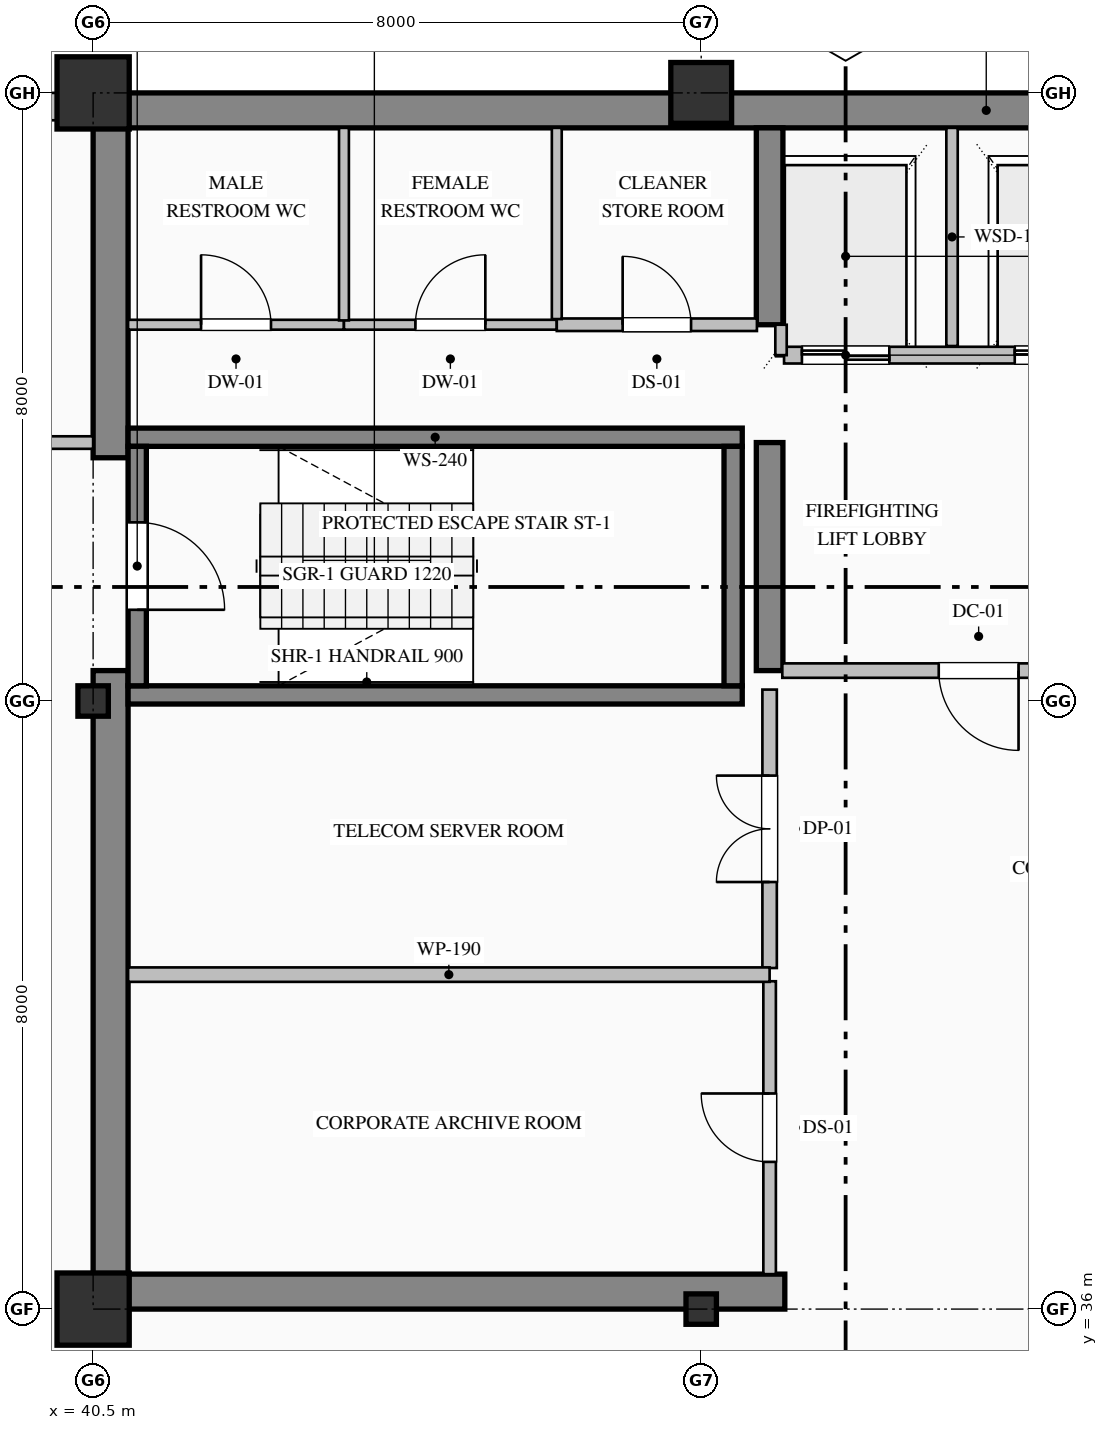
"""IFC4 building model, lengths in metres.
Left out: names, types, materials, properties, quantities, classifications, styles, units other than length and angle.
Written with IfcOpenShell. Run it as: python <this file> out.ifc"""

import sys

from ifc_helpers import new_model, si_unit, direction, frame, frame_2d, origin, origin_2d, place, context, subcontext, project, spatial, rectangle, hollow_rectangle, i_section, extrude, element, fill, save


model = new_model("IFC4")
c1 = context("Model", 3, precision=1e-05, world=origin(), true_north=direction((0.0, 1.0)))
c2 = subcontext(c1, "Body", "Model", "MODEL_VIEW")
j1 = project(units=[si_unit("LENGTHUNIT", "METRE"), si_unit("PLANEANGLEUNIT", "RADIAN")], contexts=[c1])
p1 = place(None, origin())
s1 = spatial("IfcSite", under=j1, at=p1, CompositionType="ELEMENT")
p2 = place(p1, origin())
s2 = spatial("IfcBuilding", under=s1, at=p2, CompositionType="ELEMENT")
p3 = place(p2, frame((0.0, 0.0, 237.8)))
s3 = spatial("IfcBuildingStorey", under=s2, at=p3, CompositionType="ELEMENT", Elevation=237.8)
p4 = place(p3, frame((40.5, 51.77, 0.0), z_axis=(0.0, 0.0, 1.0), x_axis=(1.0, 0.0, 0.0)))
e1 = element("IfcWall", 1, at=p4, inside=s3, PredefinedType="SHEAR", context=c2, shape_type="SweptSolid", body=[
    extrude(rectangle(XDim=23.5, YDim=0.46, at=frame_2d((11.75, 0.0))), origin(), (0.0, 0.0, 1.0), 3.775),
])
p5 = place(p3, frame((40.73, 36.46, 0.0), z_axis=(0.0, 0.0, 1.0), x_axis=(0.0, 1.0, 0.0)))
e2 = element("IfcWall", 2, at=p5, inside=s3, PredefinedType="SHEAR", context=c2, shape_type="SweptSolid", body=[
    extrude(rectangle(XDim=7.94, YDim=0.46, at=frame_2d((3.97, 0.0))), origin(), (0.0, 0.0, 1.0), 3.775),
])
p6 = place(p3, frame((40.73, 47.2, 0.0), z_axis=(0.0, 0.0, 1.0), x_axis=(0.0, 1.0, 0.0)))
e3 = element("IfcWall", 3, at=p6, inside=s3, PredefinedType="SHEAR", context=c2, shape_type="SweptSolid", body=[
    extrude(rectangle(XDim=4.34, YDim=0.46, at=frame_2d((2.17, 0.0))), origin(), (0.0, 0.0, 1.0), 3.775),
])
p7 = place(p3, frame((40.5, 36.23, 0.0), z_axis=(0.0, 0.0, 1.0), x_axis=(1.0, 0.0, 0.0)))
e4 = element("IfcWall", 4, at=p7, inside=s3, PredefinedType="SHEAR", context=c2, shape_type="SweptSolid", body=[
    extrude(rectangle(XDim=9.1, YDim=0.46, at=frame_2d((4.55, 0.0))), origin(), (0.0, 0.0, 1.0), 3.775),
])
p8 = place(p3, frame((49.4, 44.4, 0.0), z_axis=(0.0, 0.0, 1.0), x_axis=(0.0, 1.0, 0.0)))
e5 = element("IfcWall", 5, at=p8, inside=s3, PredefinedType="SHEAR", context=c2, shape_type="SweptSolid", body=[
    extrude(rectangle(XDim=3.0, YDim=0.35, at=frame_2d((1.5, 0.0))), origin(), (0.0, 0.0, 1.0), 3.775),
])
p9 = place(p3, frame((49.4, 48.95, 0.0), z_axis=(0.0, 0.0, 1.0), x_axis=(0.0, 1.0, 0.0)))
e6 = element("IfcWall", 6, at=p9, inside=s3, PredefinedType="SHEAR", context=c2, shape_type="SweptSolid", body=[
    extrude(rectangle(XDim=2.59, YDim=0.35, at=frame_2d((1.295, 0.0))), origin(), (0.0, 0.0, 1.0), 3.775),
])
p10 = place(p3, frame((40.5, 36.0, 0.0), z_axis=(0.0, 0.0, 1.0), x_axis=(1.0, 0.0, 0.0)))
e7 = element("IfcColumn", 7, at=p10, inside=s3, PredefinedType="COLUMN", context=c2, shape_type="SweptSolid", body=[
    extrude(hollow_rectangle(XDim=0.95, YDim=0.95, WallThickness=0.036, at=origin_2d()), origin(), (0.0, 0.0, 1.0), 4.0),
])
p11 = place(p3, frame((40.5, 44.0, 0.0), z_axis=(0.0, 0.0, 1.0), x_axis=(1.0, 0.0, 0.0)))
e8 = element("IfcColumn", 8, at=p11, inside=s3, PredefinedType="COLUMN", context=c2, shape_type="SweptSolid", body=[
    extrude(i_section(OverallWidth=0.4, OverallDepth=0.4, WebThickness=0.013, FlangeThickness=0.021, FilletRadius=0.022, at=origin_2d()), origin(), (0.0, 0.0, 1.0), 4.0),
])
p12 = place(p3, frame((40.5, 52.0, 0.0), z_axis=(0.0, 0.0, 1.0), x_axis=(1.0, 0.0, 0.0)))
e9 = element("IfcColumn", 9, at=p12, inside=s3, PredefinedType="COLUMN", context=c2, shape_type="SweptSolid", body=[
    extrude(hollow_rectangle(XDim=0.95, YDim=0.95, WallThickness=0.036, at=origin_2d()), origin(), (0.0, 0.0, 1.0), 4.0),
])
p13 = place(p3, frame((48.5, 36.0, 0.0), z_axis=(0.0, 0.0, 1.0), x_axis=(1.0, 0.0, 0.0)))
e10 = element("IfcColumn", 10, at=p13, inside=s3, PredefinedType="COLUMN", context=c2, shape_type="SweptSolid", body=[
    extrude(i_section(OverallWidth=0.4, OverallDepth=0.4, WebThickness=0.013, FlangeThickness=0.021, FilletRadius=0.022, at=origin_2d()), origin(), (0.0, 0.0, 1.0), 4.0),
])
p14 = place(p3, frame((48.5, 52.0, 0.0), z_axis=(0.0, 0.0, 1.0), x_axis=(1.0, 0.0, 0.0)))
e11 = element("IfcColumn", 11, at=p14, inside=s3, PredefinedType="COLUMN", context=c2, shape_type="SweptSolid", body=[
    extrude(hollow_rectangle(XDim=0.8, YDim=0.8, WallThickness=0.032, at=origin_2d()), origin(), (0.0, 0.0, 1.0), 4.0),
])
p15 = place(p3, frame((13.0, 51.82, 0.0), z_axis=(0.0, 0.0, 1.0), x_axis=(1.0, 0.0, 0.0)))
e12 = element("IfcWall", 12, at=p15, inside=s3, PredefinedType="SOLIDWALL", context=c2, shape_type="SweptSolid", body=[
    extrude(rectangle(XDim=27.52, YDim=0.36, at=frame_2d((13.76, 0.0))), origin(), (0.0, 0.0, 1.0), 3.325),
])
p16 = place(p15, frame((6.6, 0.0, 0.9)))
e13 = element("IfcOpeningElement", 13, at=p16, cuts=e12, PredefinedType="OPENING", context=c2, shape_type="SweptSolid", body=[
    extrude(rectangle(XDim=1.2, YDim=1.85, at=frame_2d((0.6, 0.925))), frame((0.0, 0.19, 0.0), z_axis=(0.0, -1.0, 0.0), x_axis=(1.0, 0.0, 0.0)), (0.0, 0.0, 1.0), 0.38),
])
p17 = place(p15, frame((17.4, 0.0, 0.9)))
e14 = element("IfcOpeningElement", 14, at=p17, cuts=e12, PredefinedType="OPENING", context=c2, shape_type="SweptSolid", body=[
    extrude(rectangle(XDim=1.2, YDim=1.85, at=frame_2d((0.6, 0.925))), frame((0.0, 0.19, 0.0), z_axis=(0.0, -1.0, 0.0), x_axis=(1.0, 0.0, 0.0)), (0.0, 0.0, 1.0), 0.38),
])
for number, where, z_axis, x_axis in (
    (15, (40.96, 47.47, 0.0), (0.0, 0.0, 1.0), (1.0, 0.0, 0.0)),
    (16, (49.04, 44.08, 0.0), (0.0, 0.0, 1.0), (-1.0, 0.0, 0.0)),
):
    element("IfcWall", number, at=place(p3, frame(where, z_axis=z_axis, x_axis=x_axis)), inside=s3, PredefinedType="SOLIDWALL", context=c2, shape_type="SweptSolid", body=[
        extrude(rectangle(XDim=8.08, YDim=0.24, at=frame_2d((4.04, 0.0))), origin(), (0.0, 0.0, 1.0), 4.0),
    ])
p18 = place(p3, frame((41.08, 47.35, 0.0), z_axis=(0.0, 0.0, 1.0), x_axis=(0.0, -1.0, 0.0)))
e17 = element("IfcWall", 17, at=p18, inside=s3, PredefinedType="SOLIDWALL", context=c2, shape_type="SweptSolid", body=[
    extrude(rectangle(XDim=3.15, YDim=0.24, at=frame_2d((1.575, 0.0))), origin(), (0.0, 0.0, 1.0), 4.0),
])
p19 = place(p18, frame((1.0, 0.0, 0.0)))
e18 = element("IfcOpeningElement", 18, at=p19, cuts=e17, PredefinedType="OPENING", context=c2, shape_type="SweptSolid", body=[
    extrude(rectangle(XDim=1.15, YDim=2.2, at=frame_2d((0.575, 1.1))), frame((0.0, 0.13, 0.0), z_axis=(0.0, -1.0, 0.0), x_axis=(1.0, 0.0, 0.0)), (0.0, 0.0, 1.0), 0.26),
])
p20 = place(p3, frame((48.92, 44.2, 0.0), z_axis=(0.0, 0.0, 1.0), x_axis=(0.0, 1.0, 0.0)))
e19 = element("IfcWall", 19, at=p20, inside=s3, PredefinedType="SOLIDWALL", context=c2, shape_type="SweptSolid", body=[
    extrude(rectangle(XDim=3.15, YDim=0.24, at=frame_2d((1.575, 0.0))), origin(), (0.0, 0.0, 1.0), 4.0),
])
p21 = place(p3, frame((54.71, 48.55, 0.0), z_axis=(0.0, 0.0, 1.0), x_axis=(-1.0, 0.0, 0.0)))
e20 = element("IfcWall", 20, at=p21, inside=s3, PredefinedType="PARTITIONING", context=c2, shape_type="SweptSolid", body=[
    extrude(rectangle(XDim=5.12, YDim=0.22, at=frame_2d((2.56, 0.0))), origin(), (0.0, 0.0, 1.0), 3.775),
])
p22 = place(p21, frame((3.735, 0.0, 0.0)))
e21 = element("IfcOpeningElement", 21, at=p22, cuts=e20, PredefinedType="OPENING", context=c2, shape_type="SweptSolid", body=[
    extrude(rectangle(XDim=1.15, YDim=2.2, at=frame_2d((0.575, 1.1))), frame((0.0, 0.12, 0.0), z_axis=(0.0, -1.0, 0.0), x_axis=(1.0, 0.0, 0.0)), (0.0, 0.0, 1.0), 0.24),
])
p23 = place(p21, frame((0.935, 0.0, 0.0)))
e22 = element("IfcOpeningElement", 22, at=p23, cuts=e20, PredefinedType="OPENING", context=c2, shape_type="SweptSolid", body=[
    extrude(rectangle(XDim=1.15, YDim=2.2, at=frame_2d((0.575, 1.1))), frame((0.0, 0.12, 0.0), z_axis=(0.0, -1.0, 0.0), x_axis=(1.0, 0.0, 0.0)), (0.0, 0.0, 1.0), 0.24),
])
p24 = place(p3, frame((51.8, 48.67, 0.0), z_axis=(0.0, 0.0, 1.0), x_axis=(0.0, 1.0, 0.0)))
e23 = element("IfcWall", 23, at=p24, inside=s3, PredefinedType="PARTITIONING", context=c2, shape_type="SweptSolid", body=[
    extrude(rectangle(XDim=2.87, YDim=0.15, at=frame_2d((1.435, 0.0))), origin(), (0.0, 0.0, 1.0), 3.775),
])
p25 = place(p3, frame((49.55, 48.55, 0.0), z_axis=(0.0, 0.0, 1.0), x_axis=(0.0, 1.0, 0.0)))
e24 = element("IfcWall", 24, at=p25, inside=s3, PredefinedType="PARTITIONING", context=c2, shape_type="SweptSolid", body=[
    extrude(rectangle(XDim=0.4, YDim=0.15, at=frame_2d((0.2, 0.0))), origin(), (0.0, 0.0, 1.0), 3.775),
])
p26 = place(p3, frame((37.8, 47.4, 0.0), z_axis=(0.0, 0.0, 1.0), x_axis=(1.0, 0.0, 0.0)))
e25 = element("IfcWall", 25, at=p26, inside=s3, PredefinedType="PARTITIONING", context=c2, shape_type="SweptSolid", body=[
    extrude(rectangle(XDim=2.7, YDim=0.165, at=frame_2d((1.35, 0.0))), origin(), (0.0, 0.0, 1.0), 3.775),
])
p27 = place(p26, frame((0.825, 0.0, 0.0)))
e26 = element("IfcOpeningElement", 26, at=p27, cuts=e25, PredefinedType="OPENING", context=c2, shape_type="SweptSolid", body=[
    extrude(rectangle(XDim=1.05, YDim=2.15, at=frame_2d((0.525, 1.075))), frame((0.0, 0.093, 0.0), z_axis=(0.0, -1.0, 0.0), x_axis=(1.0, 0.0, 0.0)), (0.0, 0.0, 1.0), 0.185),
])
p28 = place(p3, frame((40.96, 48.95, 0.0), z_axis=(0.0, 0.0, 1.0), x_axis=(1.0, 0.0, 0.0)))
e27 = element("IfcWall", 27, at=p28, inside=s3, PredefinedType="PARTITIONING", context=c2, shape_type="SweptSolid", body=[
    extrude(rectangle(XDim=2.84, YDim=0.13, at=frame_2d((1.42, 0.0))), origin(), (0.0, 0.0, 1.0), 3.775),
])
p29 = place(p28, frame((0.96, 0.0, 0.0)))
e28 = element("IfcOpeningElement", 28, at=p29, cuts=e27, PredefinedType="OPENING", context=c2, shape_type="SweptSolid", body=[
    extrude(rectangle(XDim=0.92, YDim=2.15, at=frame_2d((0.46, 1.075))), frame((0.0, 0.075, 0.0), z_axis=(0.0, -1.0, 0.0), x_axis=(1.0, 0.0, 0.0)), (0.0, 0.0, 1.0), 0.15),
])
p30 = place(p3, frame((43.8, 48.95, 0.0), z_axis=(0.0, 0.0, 1.0), x_axis=(1.0, 0.0, 0.0)))
e29 = element("IfcWall", 29, at=p30, inside=s3, PredefinedType="PARTITIONING", context=c2, shape_type="SweptSolid", body=[
    extrude(rectangle(XDim=2.8, YDim=0.13, at=frame_2d((1.4, 0.0))), origin(), (0.0, 0.0, 1.0), 3.775),
])
p31 = place(p30, frame((0.94, 0.0, 0.0)))
e30 = element("IfcOpeningElement", 30, at=p31, cuts=e29, PredefinedType="OPENING", context=c2, shape_type="SweptSolid", body=[
    extrude(rectangle(XDim=0.92, YDim=2.15, at=frame_2d((0.46, 1.075))), frame((0.0, 0.075, 0.0), z_axis=(0.0, -1.0, 0.0), x_axis=(1.0, 0.0, 0.0)), (0.0, 0.0, 1.0), 0.15),
])
p32 = place(p3, frame((46.6, 48.95, 0.0), z_axis=(0.0, 0.0, 1.0), x_axis=(1.0, 0.0, 0.0)))
e31 = element("IfcWall", 31, at=p32, inside=s3, PredefinedType="PARTITIONING", context=c2, shape_type="SweptSolid", body=[
    extrude(rectangle(XDim=2.633, YDim=0.165, at=frame_2d((1.316, 0.0))), origin(), (0.0, 0.0, 1.0), 3.775),
])
p33 = place(p32, frame((0.866, 0.0, 0.0)))
e32 = element("IfcOpeningElement", 32, at=p33, cuts=e31, PredefinedType="OPENING", context=c2, shape_type="SweptSolid", body=[
    extrude(rectangle(XDim=0.9, YDim=2.15, at=frame_2d((0.45, 1.075))), frame((0.0, 0.093, 0.0), z_axis=(0.0, -1.0, 0.0), x_axis=(1.0, 0.0, 0.0)), (0.0, 0.0, 1.0), 0.185),
])
p34 = place(p3, frame((54.733, 44.4, 0.0), z_axis=(0.0, 0.0, 1.0), x_axis=(-1.0, 0.0, 0.0)))
e33 = element("IfcWall", 33, at=p34, inside=s3, PredefinedType="PARTITIONING", context=c2, shape_type="SweptSolid", body=[
    extrude(rectangle(XDim=5.166, YDim=0.19, at=frame_2d((2.583, 0.0))), origin(), (0.0, 0.0, 1.0), 3.775),
])
p35 = place(p34, frame((2.058, 0.0, 0.0)))
e34 = element("IfcOpeningElement", 34, at=p35, cuts=e33, PredefinedType="OPENING", context=c2, shape_type="SweptSolid", body=[
    extrude(rectangle(XDim=1.05, YDim=2.15, at=frame_2d((0.525, 1.075))), frame((0.0, 0.105, 0.0), z_axis=(0.0, -1.0, 0.0), x_axis=(1.0, 0.0, 0.0)), (0.0, 0.0, 1.0), 0.21),
])
p36 = place(p3, frame((49.4, 36.46, 0.0), z_axis=(0.0, 0.0, 1.0), x_axis=(0.0, 1.0, 0.0)))
e35 = element("IfcWall", 35, at=p36, inside=s3, PredefinedType="PARTITIONING", context=c2, shape_type="SweptSolid", body=[
    extrude(rectangle(XDim=3.853, YDim=0.165, at=frame_2d((1.927, 0.0))), origin(), (0.0, 0.0, 1.0), 3.017),
])
p37 = place(p36, frame((1.477, 0.0, 0.0)))
e36 = element("IfcOpeningElement", 36, at=p37, cuts=e35, PredefinedType="OPENING", context=c2, shape_type="SweptSolid", body=[
    extrude(rectangle(XDim=0.9, YDim=2.15, at=frame_2d((0.45, 1.075))), frame((0.0, 0.093, 0.0), z_axis=(0.0, -1.0, 0.0), x_axis=(1.0, 0.0, 0.0)), (0.0, 0.0, 1.0), 0.185),
])
p38 = place(p3, frame((49.4, 40.487, 0.0), z_axis=(0.0, 0.0, 1.0), x_axis=(0.0, 1.0, 0.0)))
e37 = element("IfcWall", 37, at=p38, inside=s3, PredefinedType="PARTITIONING", context=c2, shape_type="SweptSolid", body=[
    extrude(rectangle(XDim=3.663, YDim=0.19, at=frame_2d((1.832, 0.0))), origin(), (0.0, 0.0, 1.0), 3.017),
])
p39 = place(p38, frame((1.132, 0.0, 0.0)))
e38 = element("IfcOpeningElement", 38, at=p39, cuts=e37, PredefinedType="OPENING", context=c2, shape_type="SweptSolid", body=[
    extrude(rectangle(XDim=1.4, YDim=2.25, at=frame_2d((0.7, 1.125))), frame((0.0, 0.105, 0.0), z_axis=(0.0, -1.0, 0.0), x_axis=(1.0, 0.0, 0.0)), (0.0, 0.0, 1.0), 0.21),
])
p40 = place(p3, frame((40.96, 40.4, 0.0), z_axis=(0.0, 0.0, 1.0), x_axis=(1.0, 0.0, 0.0)))
e39 = element("IfcWall", 39, at=p40, inside=s3, PredefinedType="PARTITIONING", context=c2, shape_type="SweptSolid", body=[
    extrude(rectangle(XDim=8.44, YDim=0.19, at=frame_2d((4.22, 0.0))), origin(), (0.0, 0.0, 1.0), 3.775),
])
p41 = place(p3, frame((43.8, 51.54, 0.0), z_axis=(0.0, 0.0, 1.0), x_axis=(0.0, -1.0, 0.0)))
e40 = element("IfcWall", 40, at=p41, inside=s3, PredefinedType="PARTITIONING", context=c2, shape_type="SweptSolid", body=[
    extrude(rectangle(XDim=2.533, YDim=0.13, at=frame_2d((1.267, 0.0))), origin(), (0.0, 0.0, 1.0), 3.775),
])
p42 = place(p3, frame((46.6, 51.54, 0.0), z_axis=(0.0, 0.0, 1.0), x_axis=(0.0, -1.0, 0.0)))
e41 = element("IfcWall", 41, at=p42, inside=s3, PredefinedType="PARTITIONING", context=c2, shape_type="SweptSolid", body=[
    extrude(rectangle(XDim=2.516, YDim=0.13, at=frame_2d((1.258, 0.0))), origin(), (0.0, 0.0, 1.0), 3.775),
])
p43 = place(p19, origin())
e42 = element("IfcDoor", 42, at=p43, inside=s3, OperationType="SINGLE_SWING_RIGHT", PredefinedType="DOOR", context=c2, shape_type="SweptSolid", body=[
    extrude(rectangle(XDim=1.15, YDim=2.2, at=frame_2d((0.575, 1.1))), frame((0.0, 0.025, 0.0), z_axis=(0.0, -1.0, 0.0), x_axis=(1.0, 0.0, 0.0)), (0.0, 0.0, 1.0), 0.05),
])
fill(e18, e42)
p44 = place(p22, origin())
e43 = element("IfcDoor", 43, at=p44, inside=s3, OperationType="DOUBLE_DOOR_SLIDING", PredefinedType="DOOR", context=c2, shape_type="SweptSolid", body=[
    extrude(rectangle(XDim=1.15, YDim=2.2, at=frame_2d((0.575, 1.1))), frame((0.0, 0.025, 0.0), z_axis=(0.0, -1.0, 0.0), x_axis=(1.0, 0.0, 0.0)), (0.0, 0.0, 1.0), 0.05),
])
fill(e21, e43)
p45 = place(p23, origin())
e44 = element("IfcDoor", 44, at=p45, inside=s3, OperationType="DOUBLE_DOOR_SLIDING", PredefinedType="DOOR", context=c2, shape_type="SweptSolid", body=[
    extrude(rectangle(XDim=1.15, YDim=2.2, at=frame_2d((0.575, 1.1))), frame((0.0, 0.025, 0.0), z_axis=(0.0, -1.0, 0.0), x_axis=(1.0, 0.0, 0.0)), (0.0, 0.0, 1.0), 0.05),
])
fill(e22, e44)
p46 = place(p35, origin())
e45 = element("IfcDoor", 45, at=p46, inside=s3, OperationType="SINGLE_SWING_LEFT", PredefinedType="DOOR", context=c2, shape_type="SweptSolid", body=[
    extrude(rectangle(XDim=1.05, YDim=2.15, at=frame_2d((0.525, 1.075))), frame((0.0, 0.025, 0.0), z_axis=(0.0, -1.0, 0.0), x_axis=(1.0, 0.0, 0.0)), (0.0, 0.0, 1.0), 0.05),
])
fill(e34, e45)
p47 = place(p37, origin())
e46 = element("IfcDoor", 46, at=p47, inside=s3, OperationType="SINGLE_SWING_RIGHT", PredefinedType="DOOR", context=c2, shape_type="SweptSolid", body=[
    extrude(rectangle(XDim=0.9, YDim=2.15, at=frame_2d((0.45, 1.075))), frame((0.0, 0.025, 0.0), z_axis=(0.0, -1.0, 0.0), x_axis=(1.0, 0.0, 0.0)), (0.0, 0.0, 1.0), 0.05),
])
fill(e36, e46)
p48 = place(p39, origin())
e47 = element("IfcDoor", 47, at=p48, inside=s3, OperationType="DOUBLE_DOOR_SINGLE_SWING", PredefinedType="DOOR", context=c2, shape_type="SweptSolid", body=[
    extrude(rectangle(XDim=1.4, YDim=2.25, at=frame_2d((0.7, 1.125))), frame((0.0, 0.025, 0.0), z_axis=(0.0, -1.0, 0.0), x_axis=(1.0, 0.0, 0.0)), (0.0, 0.0, 1.0), 0.05),
])
fill(e38, e47)
p49 = place(p29, origin())
e48 = element("IfcDoor", 48, at=p49, inside=s3, OperationType="SINGLE_SWING_LEFT", PredefinedType="DOOR", context=c2, shape_type="SweptSolid", body=[
    extrude(rectangle(XDim=0.92, YDim=2.15, at=frame_2d((0.46, 1.075))), frame((0.0, 0.025, 0.0), z_axis=(0.0, -1.0, 0.0), x_axis=(1.0, 0.0, 0.0)), (0.0, 0.0, 1.0), 0.05),
])
fill(e28, e48)
p50 = place(p31, origin())
e49 = element("IfcDoor", 49, at=p50, inside=s3, OperationType="SINGLE_SWING_RIGHT", PredefinedType="DOOR", context=c2, shape_type="SweptSolid", body=[
    extrude(rectangle(XDim=0.92, YDim=2.15, at=frame_2d((0.46, 1.075))), frame((0.0, 0.025, 0.0), z_axis=(0.0, -1.0, 0.0), x_axis=(1.0, 0.0, 0.0)), (0.0, 0.0, 1.0), 0.05),
])
fill(e30, e49)
p51 = place(p33, origin())
e50 = element("IfcDoor", 50, at=p51, inside=s3, OperationType="SINGLE_SWING_LEFT", PredefinedType="DOOR", context=c2, shape_type="SweptSolid", body=[
    extrude(rectangle(XDim=0.9, YDim=2.15, at=frame_2d((0.45, 1.075))), frame((0.0, 0.025, 0.0), z_axis=(0.0, -1.0, 0.0), x_axis=(1.0, 0.0, 0.0)), (0.0, 0.0, 1.0), 0.05),
])
fill(e32, e50)
save(model, sys.argv[1])
